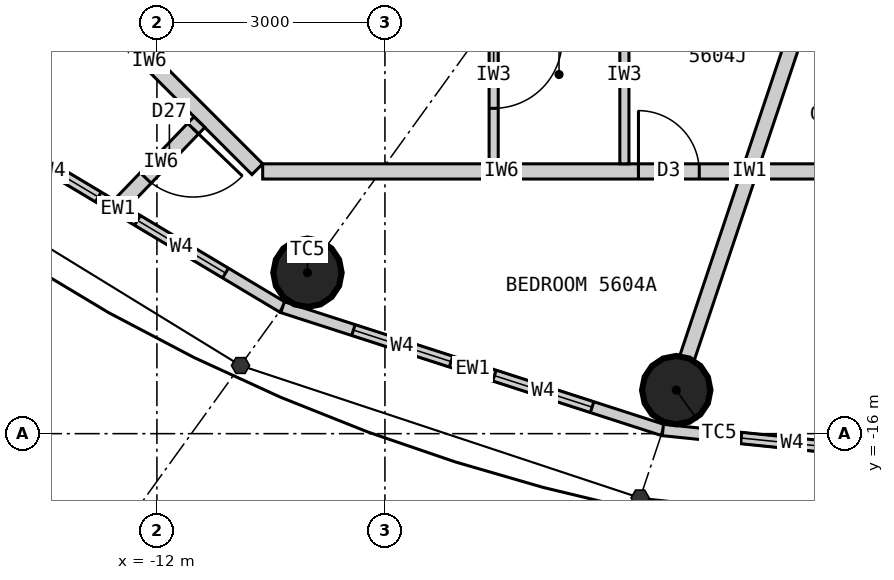
"""IFC4 building model, lengths in metres.
Left out: names, types, materials, properties, quantities, classifications, styles, units other than length and angle.
Written with IfcOpenShell. Run it as: python <this file> out.ifc"""

import sys

from ifc_helpers import new_model, si_unit, direction, frame, frame_2d, origin, origin_2d, place, context, subcontext, project, spatial, rectangle, circle, extrude, element, fill, save


model = new_model("IFC4")
c1 = context("Model", 3, precision=1e-05, world=origin(), true_north=direction((0.0, 1.0)))
c2 = subcontext(c1, "Body", "Model", "MODEL_VIEW")
j1 = project(units=[si_unit("LENGTHUNIT", "METRE"), si_unit("PLANEANGLEUNIT", "RADIAN")], contexts=[c1])
p1 = place(None, origin())
s1 = spatial("IfcSite", under=j1, at=p1, CompositionType="ELEMENT")
p2 = place(p1, origin())
s2 = spatial("IfcBuilding", under=s1, at=p2, CompositionType="ELEMENT")
p3 = place(p2, frame((0.0, 0.0, 209.4)))
s3 = spatial("IfcBuildingStorey", under=s2, at=p3, CompositionType="ELEMENT", Elevation=209.4)
for number, where, z_axis, x_axis in (
    (1, (-10.019, -13.883, 0.0), (0.0, 0.0, 1.0), (1.0, 0.0, 0.0)),
    (2, (-5.167, -15.427, 0.0), (0.0, 0.0, 1.0), (1.0, 0.0, 0.0)),
):
    element("IfcColumn", number, at=place(p3, frame(where, z_axis=z_axis, x_axis=x_axis)), inside=s3, PredefinedType="COLUMN", context=c2, shape_type="SweptSolid", body=[
        extrude(circle(Radius=0.45, at=origin_2d()), origin(), (0.0, 0.0, 1.0), 3.3),
    ])
p4 = place(p3, frame((-14.68, -11.744, 0.0), z_axis=(0.0, 0.0, 1.0), x_axis=(0.85822150553, -0.513279502265, 0.0)))
e3 = element("IfcWall", 3, at=p4, inside=s3, PredefinedType="ELEMENTEDWALL", context=c2, shape_type="SweptSolid", body=[
    extrude(rectangle(XDim=5.05, YDim=0.15, at=frame_2d((2.525, 0.0))), origin(), (0.0, 0.0, 1.0), 3.12),
])
p5 = place(p4, frame((0.875, 0.0, 0.9)))
e4 = element("IfcOpeningElement", 4, at=p5, cuts=e3, PredefinedType="OPENING", context=c2, shape_type="SweptSolid", body=[
    extrude(rectangle(XDim=1.35, YDim=1.9, at=frame_2d((0.675, 0.95))), frame((0.0, 0.085, 0.0), z_axis=(0.0, -1.0, 0.0), x_axis=(1.0, 0.0, 0.0)), (0.0, 0.0, 1.0), 0.17),
])
p6 = place(p4, frame((2.825, 0.0, 0.9)))
e5 = element("IfcOpeningElement", 5, at=p6, cuts=e3, PredefinedType="OPENING", context=c2, shape_type="SweptSolid", body=[
    extrude(rectangle(XDim=1.35, YDim=1.9, at=frame_2d((0.675, 0.95))), frame((0.0, 0.085, 0.0), z_axis=(0.0, -1.0, 0.0), x_axis=(1.0, 0.0, 0.0)), (0.0, 0.0, 1.0), 0.17),
])
p7 = place(p3, frame((-10.346, -14.336, 0.0), z_axis=(0.0, 0.0, 1.0), x_axis=(0.951644702515, -0.307200846638, 0.0)))
e6 = element("IfcWall", 6, at=p7, inside=s3, PredefinedType="ELEMENTEDWALL", context=c2, shape_type="SweptSolid", body=[
    extrude(rectangle(XDim=5.258, YDim=0.15, at=frame_2d((2.629, 0.0))), origin(), (0.0, 0.0, 1.0), 3.12),
])
p8 = place(p7, frame((0.979, 0.0, 0.9)))
e7 = element("IfcOpeningElement", 7, at=p8, cuts=e6, PredefinedType="OPENING", context=c2, shape_type="SweptSolid", body=[
    extrude(rectangle(XDim=1.35, YDim=1.9, at=frame_2d((0.675, 0.95))), frame((0.0, 0.085, 0.0), z_axis=(0.0, -1.0, 0.0), x_axis=(1.0, 0.0, 0.0)), (0.0, 0.0, 1.0), 0.17),
])
p9 = place(p7, frame((2.929, 0.0, 0.9)))
e8 = element("IfcOpeningElement", 8, at=p9, cuts=e6, PredefinedType="OPENING", context=c2, shape_type="SweptSolid", body=[
    extrude(rectangle(XDim=1.35, YDim=1.9, at=frame_2d((0.675, 0.95))), frame((0.0, 0.085, 0.0), z_axis=(0.0, -1.0, 0.0), x_axis=(1.0, 0.0, 0.0)), (0.0, 0.0, 1.0), 0.17),
])
p10 = place(p3, frame((-5.343, -15.952, 0.0), z_axis=(0.0, 0.0, 1.0), x_axis=(0.994774574972, -0.102095763818, 0.0)))
e9 = element("IfcWall", 9, at=p10, inside=s3, PredefinedType="ELEMENTEDWALL", context=c2, shape_type="SweptSolid", body=[
    extrude(rectangle(XDim=5.371, YDim=0.15, at=frame_2d((2.686, 0.0))), origin(), (0.0, 0.0, 1.0), 3.12),
])
p11 = place(p10, frame((1.035, 0.0, 0.9)))
e10 = element("IfcOpeningElement", 10, at=p11, cuts=e9, PredefinedType="OPENING", context=c2, shape_type="SweptSolid", body=[
    extrude(rectangle(XDim=1.35, YDim=1.9, at=frame_2d((0.675, 0.95))), frame((0.0, 0.085, 0.0), z_axis=(0.0, -1.0, 0.0), x_axis=(1.0, 0.0, 0.0)), (0.0, 0.0, 1.0), 0.17),
])
p12 = place(p10, frame((2.985, 0.0, 0.9)))
e11 = element("IfcOpeningElement", 11, at=p12, cuts=e9, PredefinedType="OPENING", context=c2, shape_type="SweptSolid", body=[
    extrude(rectangle(XDim=1.35, YDim=1.9, at=frame_2d((0.675, 0.95))), frame((0.0, 0.085, 0.0), z_axis=(0.0, -1.0, 0.0), x_axis=(1.0, 0.0, 0.0)), (0.0, 0.0, 1.0), 0.17),
])
p13 = place(p3, frame((-3.383, -10.1, 0.0), z_axis=(0.0, 0.0, 1.0), x_axis=(-0.317602151035, -0.948224063003, 0.0)))
e12 = element("IfcWall", 12, at=p13, inside=s3, PredefinedType="PARTITIONING", context=c2, shape_type="SweptSolid", body=[
    extrude(rectangle(XDim=5.168, YDim=0.2, at=frame_2d((2.584, 0.0))), origin(), (0.0, 0.0, 1.0), 2.42),
])
p14 = place(p3, frame((-13.521, -9.679, 0.0), z_axis=(0.0, 0.0, 1.0), x_axis=(0.707106781187, -0.707106781187, 0.0)))
e13 = element("IfcWall", 13, at=p14, inside=s3, PredefinedType="PARTITIONING", context=c2, shape_type="SweptSolid", body=[
    extrude(rectangle(XDim=4.019, YDim=0.2, at=frame_2d((2.009, 0.0))), origin(), (0.0, 0.0, 1.0), 3.12),
])
p15 = place(p3, frame((-10.609, -12.55, 0.0), z_axis=(0.0, 0.0, 1.0), x_axis=(1.0, 0.0, 0.0)))
e14 = element("IfcWall", 14, at=p15, inside=s3, PredefinedType="PARTITIONING", context=c2, shape_type="SweptSolid", body=[
    extrude(rectangle(XDim=6.284, YDim=0.2, at=frame_2d((3.142, 0.0))), origin(), (0.0, 0.0, 1.0), 3.12),
])
p16 = place(p15, frame((4.944, 0.0, 0.0)))
e15 = element("IfcOpeningElement", 15, at=p16, cuts=e14, PredefinedType="OPENING", context=c2, shape_type="SweptSolid", body=[
    extrude(rectangle(XDim=0.8, YDim=2.1, at=frame_2d((0.4, 1.05))), frame((0.0, 0.11, 0.0), z_axis=(0.0, -1.0, 0.0), x_axis=(1.0, 0.0, 0.0)), (0.0, 0.0, 1.0), 0.22),
])
p17 = place(p3, frame((-11.441, -11.9, 0.0), z_axis=(0.0, 0.0, 1.0), x_axis=(-0.692958717259, -0.720977264672, 0.0)))
e16 = element("IfcWall", 16, at=p17, inside=s3, PredefinedType="PARTITIONING", context=c2, shape_type="SweptSolid", body=[
    extrude(rectangle(XDim=1.464, YDim=0.2, at=frame_2d((0.732, 0.0))), origin(), (0.0, 0.0, 1.0), 3.12),
])
p18 = place(p17, frame((0.12, 0.0, 0.0)))
e17 = element("IfcOpeningElement", 17, at=p18, cuts=e16, PredefinedType="OPENING", context=c2, shape_type="SweptSolid", body=[
    extrude(rectangle(XDim=0.9, YDim=2.1, at=frame_2d((0.45, 1.05))), frame((0.0, 0.11, 0.0), z_axis=(0.0, -1.0, 0.0), x_axis=(1.0, 0.0, 0.0)), (0.0, 0.0, 1.0), 0.22),
])
p19 = place(p3, frame((-7.569, -10.1, 0.0), z_axis=(0.0, 0.0, 1.0), x_axis=(0.0, -1.0, 0.0)))
e18 = element("IfcWall", 18, at=p19, inside=s3, PredefinedType="PARTITIONING", context=c2, shape_type="SweptSolid", body=[
    extrude(rectangle(XDim=2.35, YDim=0.12, at=frame_2d((1.175, 0.0))), origin(), (0.0, 0.0, 1.0), 3.12),
])
p20 = place(p19, frame((0.72, 0.0, 0.0)))
e19 = element("IfcOpeningElement", 19, at=p20, cuts=e18, PredefinedType="OPENING", context=c2, shape_type="SweptSolid", body=[
    extrude(rectangle(XDim=0.9, YDim=2.1, at=frame_2d((0.45, 1.05))), frame((0.0, 0.07, 0.0), z_axis=(0.0, -1.0, 0.0), x_axis=(1.0, 0.0, 0.0)), (0.0, 0.0, 1.0), 0.14),
])
p21 = place(p3, frame((-5.849, -10.1, 0.0), z_axis=(0.0, 0.0, 1.0), x_axis=(0.0, -1.0, 0.0)))
e20 = element("IfcWall", 20, at=p21, inside=s3, PredefinedType="PARTITIONING", context=c2, shape_type="SweptSolid", body=[
    extrude(rectangle(XDim=2.35, YDim=0.12, at=frame_2d((1.175, 0.0))), origin(), (0.0, 0.0, 1.0), 3.12),
])
p22 = place(p3, frame((-4.082, -12.55, 0.0), z_axis=(0.0, 0.0, 1.0), x_axis=(1.0, 0.0, 0.0)))
e21 = element("IfcWall", 21, at=p22, inside=s3, PredefinedType="PARTITIONING", context=c2, shape_type="SweptSolid", body=[
    extrude(rectangle(XDim=10.446, YDim=0.2, at=frame_2d((5.223, 0.0))), origin(), (0.0, 0.0, 1.0), 3.12),
])
p23 = place(p22, frame((6.757, 0.0, 0.0)))
e22 = element("IfcOpeningElement", 22, at=p23, cuts=e21, PredefinedType="OPENING", context=c2, shape_type="SweptSolid", body=[
    extrude(rectangle(XDim=0.8, YDim=2.1, at=frame_2d((0.4, 1.05))), frame((0.0, 0.11, 0.0), z_axis=(0.0, -1.0, 0.0), x_axis=(1.0, 0.0, 0.0)), (0.0, 0.0, 1.0), 0.22),
])
p24 = place(p22, frame((3.372, 0.0, 0.0)))
e23 = element("IfcOpeningElement", 23, at=p24, cuts=e21, PredefinedType="OPENING", context=c2, shape_type="SweptSolid", body=[
    extrude(rectangle(XDim=0.9, YDim=2.1, at=frame_2d((0.45, 1.05))), frame((0.0, 0.11, 0.0), z_axis=(0.0, -1.0, 0.0), x_axis=(1.0, 0.0, 0.0)), (0.0, 0.0, 1.0), 0.22),
])
p25 = place(p5, origin())
e24 = element("IfcWindow", 24, at=p25, inside=s3, PartitioningType="SINGLE_PANEL", PredefinedType="WINDOW", context=c2, shape_type="SweptSolid", body=[
    extrude(rectangle(XDim=1.35, YDim=1.9, at=frame_2d((0.675, 0.95))), frame((0.0, 0.03, 0.0), z_axis=(0.0, -1.0, 0.0), x_axis=(1.0, 0.0, 0.0)), (0.0, 0.0, 1.0), 0.06),
])
fill(e4, e24)
p26 = place(p6, origin())
e25 = element("IfcWindow", 25, at=p26, inside=s3, PartitioningType="SINGLE_PANEL", PredefinedType="WINDOW", context=c2, shape_type="SweptSolid", body=[
    extrude(rectangle(XDim=1.35, YDim=1.9, at=frame_2d((0.675, 0.95))), frame((0.0, 0.03, 0.0), z_axis=(0.0, -1.0, 0.0), x_axis=(1.0, 0.0, 0.0)), (0.0, 0.0, 1.0), 0.06),
])
fill(e5, e25)
p27 = place(p8, origin())
e26 = element("IfcWindow", 26, at=p27, inside=s3, PartitioningType="SINGLE_PANEL", PredefinedType="WINDOW", context=c2, shape_type="SweptSolid", body=[
    extrude(rectangle(XDim=1.35, YDim=1.9, at=frame_2d((0.675, 0.95))), frame((0.0, 0.03, 0.0), z_axis=(0.0, -1.0, 0.0), x_axis=(1.0, 0.0, 0.0)), (0.0, 0.0, 1.0), 0.06),
])
fill(e7, e26)
p28 = place(p9, origin())
e27 = element("IfcWindow", 27, at=p28, inside=s3, PartitioningType="SINGLE_PANEL", PredefinedType="WINDOW", context=c2, shape_type="SweptSolid", body=[
    extrude(rectangle(XDim=1.35, YDim=1.9, at=frame_2d((0.675, 0.95))), frame((0.0, 0.03, 0.0), z_axis=(0.0, -1.0, 0.0), x_axis=(1.0, 0.0, 0.0)), (0.0, 0.0, 1.0), 0.06),
])
fill(e8, e27)
p29 = place(p11, origin())
e28 = element("IfcWindow", 28, at=p29, inside=s3, PartitioningType="SINGLE_PANEL", PredefinedType="WINDOW", context=c2, shape_type="SweptSolid", body=[
    extrude(rectangle(XDim=1.35, YDim=1.9, at=frame_2d((0.675, 0.95))), frame((0.0, 0.03, 0.0), z_axis=(0.0, -1.0, 0.0), x_axis=(1.0, 0.0, 0.0)), (0.0, 0.0, 1.0), 0.06),
])
fill(e10, e28)
p30 = place(p20, origin())
e29 = element("IfcDoor", 29, at=p30, inside=s3, OperationType="SINGLE_SWING_LEFT", PredefinedType="DOOR", context=c2, shape_type="SweptSolid", body=[
    extrude(rectangle(XDim=0.9, YDim=2.1, at=frame_2d((0.45, 1.05))), frame((0.0, 0.025, 0.0), z_axis=(0.0, -1.0, 0.0), x_axis=(1.0, 0.0, 0.0)), (0.0, 0.0, 1.0), 0.05),
])
fill(e19, e29)
p31 = place(p16, origin())
e30 = element("IfcDoor", 30, at=p31, inside=s3, OperationType="SINGLE_SWING_LEFT", PredefinedType="DOOR", context=c2, shape_type="SweptSolid", body=[
    extrude(rectangle(XDim=0.8, YDim=2.1, at=frame_2d((0.4, 1.05))), frame((0.0, 0.025, 0.0), z_axis=(0.0, -1.0, 0.0), x_axis=(1.0, 0.0, 0.0)), (0.0, 0.0, 1.0), 0.05),
])
fill(e15, e30)
p32 = place(p18, origin())
e31 = element("IfcDoor", 31, at=p32, inside=s3, OperationType="SINGLE_SWING_LEFT", PredefinedType="DOOR", context=c2, shape_type="SweptSolid", body=[
    extrude(rectangle(XDim=0.9, YDim=2.1, at=frame_2d((0.45, 1.05))), frame((0.0, 0.025, 0.0), z_axis=(0.0, -1.0, 0.0), x_axis=(1.0, 0.0, 0.0)), (0.0, 0.0, 1.0), 0.05),
])
fill(e17, e31)
save(model, sys.argv[1])
